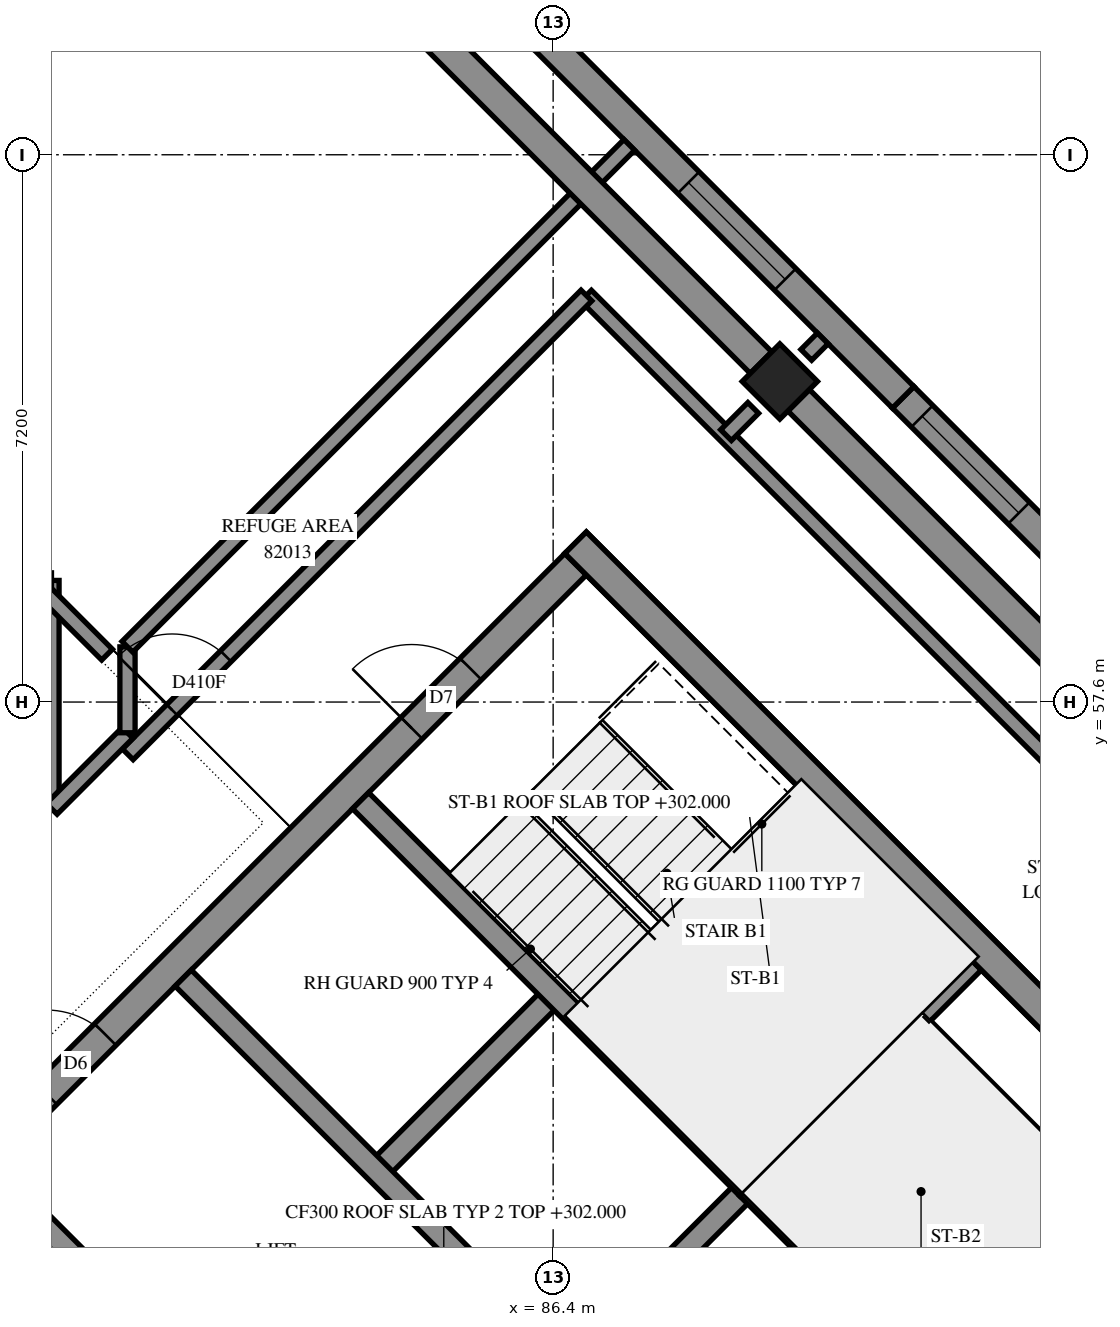
"""IFC4 building model, lengths in metres.
Left out: names, types, materials, properties, quantities, classifications, styles, units other than length and angle.
Written with IfcOpenShell. Run it as: python <this file> out.ifc"""

import sys

from ifc_helpers import new_model, si_unit, direction, frame, frame_2d, origin, origin_2d, place, context, subcontext, project, spatial, polyline, rectangle, outline, extrude, element, fill, save


model = new_model("IFC4")
c1 = context("Model", 3, precision=1e-05, world=origin(), true_north=direction((0.0, 1.0)))
c2 = subcontext(c1, "Body", "Model", "MODEL_VIEW")
j1 = project(units=[si_unit("LENGTHUNIT", "METRE"), si_unit("PLANEANGLEUNIT", "RADIAN")], contexts=[c1])
p1 = place(None, origin())
s1 = spatial("IfcSite", under=j1, at=p1, CompositionType="ELEMENT")
p2 = place(p1, origin())
s2 = spatial("IfcBuilding", under=s1, at=p2, CompositionType="ELEMENT")
p3 = place(p2, frame((0.0, 0.0, 302.0)))
s3 = spatial("IfcBuildingStorey", under=s2, at=p3, CompositionType="ELEMENT", Elevation=302.0)
p4 = place(p3, frame((89.382, 61.818, 0.0), z_axis=(0.0, 0.0, 1.0), x_axis=(0.7071067812, -0.7071067812, 0.0)))
e1 = element("IfcColumn", 1, at=p4, inside=s3, PredefinedType="COLUMN", context=c2, shape_type="SweptSolid", body=[
    extrude(rectangle(XDim=0.7, YDim=0.7, at=origin_2d()), origin(), (0.0, 0.0, 1.0), 3.5),
])
p5 = place(p3, frame((86.695, 59.696, -0.3), z_axis=(0.0, 0.0, 1.0), x_axis=(0.7071100706, -0.7071034917, 0.0)))
e2 = element("IfcWall", 2, at=p5, inside=s3, PredefinedType="SHEAR", context=c2, shape_type="SweptSolid", body=[
    extrude(outline(polyline([(0.0, 0.0), (15.2, 0.0), (15.2, 3.1), (0.0, 3.1), (0.0, 0.0)])), frame((0.0, 0.2, 0.0), z_axis=(0.0, -1.0, 0.0), x_axis=(1.0, 0.0, 0.0)), (0.0, 0.0, 1.0), 0.4),
])
p6 = place(p5, frame((10.4, 0.0, 0.3)))
e3 = element("IfcOpeningElement", 3, at=p6, cuts=e2, PredefinedType="OPENING", context=c2, shape_type="SweptSolid", body=[
    extrude(rectangle(XDim=0.8, YDim=2.1, at=frame_2d((0.4, 1.05))), frame((0.0, 0.21, 0.0), z_axis=(0.0, -1.0, 0.0), x_axis=(1.0, 0.0, 0.0)), (0.0, 0.0, 1.0), 0.42),
])
p7 = place(p3, frame((78.705, 51.423, -0.3), z_axis=(0.0, 0.0, 1.0), x_axis=(0.7071067812, 0.7071067812, 0.0)))
e4 = element("IfcWall", 4, at=p7, inside=s3, PredefinedType="SHEAR", context=c2, shape_type="SweptSolid", body=[
    extrude(outline(polyline([(0.0, 0.0), (11.3, 0.0), (11.3, 3.1), (0.0, 3.1), (0.0, 0.0)])), frame((0.0, 0.2, 0.0), z_axis=(0.0, -1.0, 0.0), x_axis=(1.0, 0.0, 0.0)), (0.0, 0.0, 1.0), 0.4),
])
p8 = place(p7, frame((1.45, 0.0, 0.3)))
e5 = element("IfcOpeningElement", 5, at=p8, cuts=e4, PredefinedType="OPENING", context=c2, shape_type="SweptSolid", body=[
    extrude(rectangle(XDim=1.1, YDim=2.1, at=frame_2d((0.55, 1.05))), frame((0.0, 0.21, 0.0), z_axis=(0.0, -1.0, 0.0), x_axis=(1.0, 0.0, 0.0)), (0.0, 0.0, 1.0), 0.42),
])
p9 = place(p7, frame((8.25, 0.0, 0.3)))
e6 = element("IfcOpeningElement", 6, at=p9, cuts=e4, PredefinedType="OPENING", context=c2, shape_type="SweptSolid", body=[
    extrude(rectangle(XDim=1.1, YDim=2.1, at=frame_2d((0.55, 1.05))), frame((0.0, 0.21, 0.0), z_axis=(0.0, -1.0, 0.0), x_axis=(1.0, 0.0, 0.0)), (0.0, 0.0, 1.0), 0.42),
])
p10 = place(p3, frame((84.079, 51.423, 0.0), z_axis=(0.0, 0.0, 1.0), x_axis=(0.7071219326, 0.7070916295, 0.0)))
e7 = element("IfcWall", 7, at=p10, inside=s3, PredefinedType="SOLIDWALL", context=c2, shape_type="SweptSolid", body=[
    extrude(outline(polyline([(0.0, 0.0), (3.3, 0.0), (3.3, 3.5), (0.0, 3.5), (0.0, 0.0)])), frame((0.0, 0.15, 0.0), z_axis=(0.0, -1.0, 0.0), x_axis=(1.0, 0.0, 0.0)), (0.0, 0.0, 1.0), 0.3),
])
p11 = place(p3, frame((86.625, 48.878, 0.0), z_axis=(0.0, 0.0, 1.0), x_axis=(0.7071067812, 0.7071067812, 0.0)))
e8 = element("IfcWall", 8, at=p11, inside=s3, PredefinedType="SOLIDWALL", context=c2, shape_type="SweptSolid", body=[
    extrude(outline(polyline([(0.0, 0.0), (3.3, 0.0), (3.3, 3.5), (0.0, 3.5), (0.0, 0.0)])), frame((0.0, 0.15, 0.0), z_axis=(0.0, -1.0, 0.0), x_axis=(1.0, 0.0, 0.0)), (0.0, 0.0, 1.0), 0.3),
])
p12 = place(p3, frame((78.988, 51.423, 0.0), z_axis=(0.0, 0.0, 1.0), x_axis=(0.7071067812, -0.7071067812, 0.0)))
e9 = element("IfcWall", 9, at=p12, inside=s3, PredefinedType="SOLIDWALL", context=c2, shape_type="SweptSolid", body=[
    extrude(outline(polyline([(0.0, 0.0), (14.4, 0.0), (14.4, 3.5), (0.0, 3.5), (0.0, 0.0)])), frame((0.0, 0.15, 0.0), z_axis=(0.0, -1.0, 0.0), x_axis=(1.0, 0.0, 0.0)), (0.0, 0.0, 1.0), 0.3),
])
p13 = place(p3, frame((81.534, 53.969, 0.0), z_axis=(0.0, 0.0, 1.0), x_axis=(0.707103309, -0.7071102534, 0.0)))
e10 = element("IfcWall", 10, at=p13, inside=s3, PredefinedType="SOLIDWALL", context=c2, shape_type="SweptSolid", body=[
    extrude(outline(polyline([(0.0, 0.0), (14.4, 0.0), (14.4, 3.5), (0.0, 3.5), (0.0, 0.0)])), frame((0.0, 0.15, 0.0), z_axis=(0.0, -1.0, 0.0), x_axis=(1.0, 0.0, 0.0)), (0.0, 0.0, 1.0), 0.3),
])
p14 = place(p13, frame((12.05, 0.0, 0.0)))
e11 = element("IfcOpeningElement", 11, at=p14, cuts=e10, PredefinedType="OPENING", context=c2, shape_type="SweptSolid", body=[
    extrude(rectangle(XDim=1.1, YDim=2.1, at=frame_2d((0.55, 1.05))), frame((0.0, 0.16, 0.0), z_axis=(0.0, -1.0, 0.0), x_axis=(1.0, 0.0, 0.0)), (0.0, 0.0, 1.0), 0.32),
])
for number, where, z_axis, x_axis in (
    (12, (83.867, 56.302, 0.0), (0.0, 0.0, 1.0), (0.707, -0.707, 0.0)),
    (13, (88.958, 51.211, 0.0), (0.0, 0.0, 1.0), (0.707, -0.707, 0.0)),
):
    element("IfcWall", number, at=place(p3, frame(where, z_axis=z_axis, x_axis=x_axis)), inside=s3, PredefinedType="SOLIDWALL", context=c2, shape_type="SweptSolid", body=[
        extrude(outline(polyline([(0.0, 0.0), (7.2, 0.0), (7.2, 3.5), (0.0, 3.5), (0.0, 0.0)])), frame((0.0, 0.15, 0.0), z_axis=(0.0, -1.0, 0.0), x_axis=(1.0, 0.0, 0.0)), (0.0, 0.0, 1.0), 0.3),
    ])
p15 = place(p3, frame((88.958, 51.211, 0.0), z_axis=(0.0, 0.0, 1.0), x_axis=(0.7071067812, 0.7071067812, 0.0)))
e14 = element("IfcWall", 14, at=p15, inside=s3, PredefinedType="SOLIDWALL", context=c2, shape_type="SweptSolid", body=[
    extrude(outline(polyline([(0.0, 0.0), (4.2, 0.0), (4.2, 3.5), (0.0, 3.5), (0.0, 0.0)])), frame((0.0, 0.15, 0.0), z_axis=(0.0, -1.0, 0.0), x_axis=(1.0, 0.0, 0.0)), (0.0, 0.0, 1.0), 0.3),
])
p16 = place(p3, frame((95.73, 56.884, 0.0), z_axis=(0.0, 0.0, 1.0), x_axis=(-0.7071067812, 0.7071067812, 0.0)))
e15 = element("IfcWall", 15, at=p16, inside=s3, PredefinedType="SOLIDWALL", context=c2, shape_type="SweptSolid", body=[
    extrude(outline(polyline([(0.0, -0.2), (6.682, -0.2), (6.682, 0.2), (0.0, 0.2), (0.0, -0.2)])), origin(), (0.0, 0.0, 1.0), 3.5),
])
p17 = place(p16, frame((1.677, 0.0, 0.7)))
e16 = element("IfcOpeningElement", 16, at=p17, cuts=e15, PredefinedType="OPENING", context=c2, shape_type="SweptSolid", body=[
    extrude(rectangle(XDim=1.8, YDim=2.2, at=frame_2d((0.9, 1.1))), frame((0.0, 0.21, 0.0), z_axis=(0.0, -1.0, 0.0), x_axis=(1.0, 0.0, 0.0)), (0.0, 0.0, 1.0), 0.42),
])
p18 = place(p16, frame((4.529, 0.0, 0.7)))
e17 = element("IfcOpeningElement", 17, at=p18, cuts=e15, PredefinedType="OPENING", context=c2, shape_type="SweptSolid", body=[
    extrude(rectangle(XDim=1.8, YDim=2.2, at=frame_2d((0.9, 1.1))), frame((0.0, 0.21, 0.0), z_axis=(0.0, -1.0, 0.0), x_axis=(1.0, 0.0, 0.0)), (0.0, 0.0, 1.0), 0.42),
])
p19 = place(p3, frame((91.005, 61.609, 0.0), z_axis=(0.0, 0.0, 1.0), x_axis=(-0.7071142638, 0.7070992985, 0.0)))
e18 = element("IfcWall", 18, at=p19, inside=s3, PredefinedType="SOLIDWALL", context=c2, shape_type="SweptSolid", body=[
    extrude(outline(polyline([(0.0, -0.2), (6.682, -0.2), (6.682, 0.2), (0.0, 0.2), (0.0, -0.2)])), origin(), (0.0, 0.0, 1.0), 3.5),
])
p20 = place(p19, frame((2.195, 0.0, 0.7)))
e19 = element("IfcOpeningElement", 19, at=p20, cuts=e18, PredefinedType="OPENING", context=c2, shape_type="SweptSolid", body=[
    extrude(rectangle(XDim=1.8, YDim=2.2, at=frame_2d((0.9, 1.1))), frame((0.0, 0.21, 0.0), z_axis=(0.0, -1.0, 0.0), x_axis=(1.0, 0.0, 0.0)), (0.0, 0.0, 1.0), 0.42),
])
p21 = place(p3, frame((72.821, 56.6, 0.0), z_axis=(0.0, 0.0, 1.0), x_axis=(0.7071067812, -0.7071067812, 0.0)))
e20 = element("IfcWall", 20, at=p21, inside=s3, PredefinedType="SOLIDWALL", context=c2, shape_type="SweptSolid", body=[
    extrude(outline(polyline([(0.083, -0.2), (30.821, -0.2), (30.421, 0.2), (-0.083, 0.2), (0.083, -0.2)])), origin(), (0.0, 0.0, 1.0), 3.5),
])
p22 = place(p21, frame((2.421, 0.0, 0.7)))
e21 = element("IfcOpeningElement", 21, at=p22, cuts=e20, PredefinedType="OPENING", context=c2, shape_type="SweptSolid", body=[
    extrude(rectangle(XDim=1.8, YDim=2.2, at=frame_2d((0.9, 1.1))), frame((0.0, 0.21, 0.0), z_axis=(0.0, -1.0, 0.0), x_axis=(1.0, 0.0, 0.0)), (0.0, 0.0, 1.0), 0.42),
])
p23 = place(p21, frame((5.521, 0.0, 0.7)))
e22 = element("IfcOpeningElement", 22, at=p23, cuts=e20, PredefinedType="OPENING", context=c2, shape_type="SweptSolid", body=[
    extrude(rectangle(XDim=1.8, YDim=2.2, at=frame_2d((0.9, 1.1))), frame((0.0, 0.21, 0.0), z_axis=(0.0, -1.0, 0.0), x_axis=(1.0, 0.0, 0.0)), (0.0, 0.0, 1.0), 0.42),
])
p24 = place(p21, frame((8.921, 0.0, 0.7)))
e23 = element("IfcOpeningElement", 23, at=p24, cuts=e20, PredefinedType="OPENING", context=c2, shape_type="SweptSolid", body=[
    extrude(rectangle(XDim=1.8, YDim=2.2, at=frame_2d((0.9, 1.1))), frame((0.0, 0.21, 0.0), z_axis=(0.0, -1.0, 0.0), x_axis=(1.0, 0.0, 0.0)), (0.0, 0.0, 1.0), 0.42),
])
p25 = place(p21, frame((12.521, 0.0, 0.7)))
e24 = element("IfcOpeningElement", 24, at=p25, cuts=e20, PredefinedType="OPENING", context=c2, shape_type="SweptSolid", body=[
    extrude(rectangle(XDim=1.8, YDim=2.2, at=frame_2d((0.9, 1.1))), frame((0.0, 0.21, 0.0), z_axis=(0.0, -1.0, 0.0), x_axis=(1.0, 0.0, 0.0)), (0.0, 0.0, 1.0), 0.42),
])
p26 = place(p21, frame((16.121, 0.0, 0.7)))
e25 = element("IfcOpeningElement", 25, at=p26, cuts=e20, PredefinedType="OPENING", context=c2, shape_type="SweptSolid", body=[
    extrude(rectangle(XDim=1.8, YDim=2.2, at=frame_2d((0.9, 1.1))), frame((0.0, 0.21, 0.0), z_axis=(0.0, -1.0, 0.0), x_axis=(1.0, 0.0, 0.0)), (0.0, 0.0, 1.0), 0.42),
])
p27 = place(p21, frame((19.721, 0.0, 0.7)))
e26 = element("IfcOpeningElement", 26, at=p27, cuts=e20, PredefinedType="OPENING", context=c2, shape_type="SweptSolid", body=[
    extrude(rectangle(XDim=1.8, YDim=2.2, at=frame_2d((0.9, 1.1))), frame((0.0, 0.21, 0.0), z_axis=(0.0, -1.0, 0.0), x_axis=(1.0, 0.0, 0.0)), (0.0, 0.0, 1.0), 0.42),
])
p28 = place(p21, frame((23.071, 0.0, 0.7)))
e27 = element("IfcOpeningElement", 27, at=p28, cuts=e20, PredefinedType="OPENING", context=c2, shape_type="SweptSolid", body=[
    extrude(rectangle(XDim=1.8, YDim=2.2, at=frame_2d((0.9, 1.1))), frame((0.0, 0.21, 0.0), z_axis=(0.0, -1.0, 0.0), x_axis=(1.0, 0.0, 0.0)), (0.0, 0.0, 1.0), 0.42),
])
p29 = place(p21, frame((26.921, 0.0, 0.7)))
e28 = element("IfcOpeningElement", 28, at=p29, cuts=e20, PredefinedType="OPENING", context=c2, shape_type="SweptSolid", body=[
    extrude(rectangle(XDim=1.8, YDim=2.2, at=frame_2d((0.9, 1.1))), frame((0.0, 0.21, 0.0), z_axis=(0.0, -1.0, 0.0), x_axis=(1.0, 0.0, 0.0)), (0.0, 0.0, 1.0), 0.42),
])
p30 = place(p3, frame((91.313, 53.354, 0.0), z_axis=(0.0, 0.0, 1.0), x_axis=(0.7071147811, -0.7070987812, 0.0)))
e29 = element("IfcWall", 29, at=p30, inside=s3, PredefinedType="PARTITIONING", context=c2, shape_type="SweptSolid", body=[
    extrude(outline(polyline([(0.0, 0.0), (6.25, 0.0), (6.25, 3.5), (0.0, 3.5), (0.0, 0.0)])), frame((0.0, 0.075, 0.0), z_axis=(0.0, -1.0, 0.0), x_axis=(1.0, 0.0, 0.0)), (0.0, 0.0, 1.0), 0.15),
])
p31 = place(p3, frame((86.833, 62.947, 0.0), z_axis=(0.0, 0.0, 1.0), x_axis=(0.7071067812, -0.7071067812, 0.0)))
e30 = element("IfcWall", 30, at=p31, inside=s3, PredefinedType="PARTITIONING", context=c2, shape_type="SweptSolid", body=[
    extrude(rectangle(XDim=19.601, YDim=0.2, at=frame_2d((9.8, 0.0))), origin(), (0.0, 0.0, 1.0), 3.5),
])
p32 = place(p31, frame((10.386, 0.0, 0.0)))
e31 = element("IfcOpeningElement", 31, at=p32, cuts=e30, PredefinedType="OPENING", context=c2, shape_type="SweptSolid", body=[
    extrude(rectangle(XDim=1.0, YDim=2.1, at=frame_2d((0.5, 1.05))), frame((0.0, 0.11, 0.0), z_axis=(0.0, -1.0, 0.0), x_axis=(1.0, 0.0, 0.0)), (0.0, 0.0, 1.0), 0.22),
])
p33 = place(p3, frame((80.804, 56.912, 0.0), z_axis=(0.0, 0.0, 1.0), x_axis=(0.7069896038, 0.7072239391, 0.0)))
e32 = element("IfcWall", 32, at=p33, inside=s3, PredefinedType="PARTITIONING", context=c2, shape_type="SweptSolid", body=[
    extrude(rectangle(XDim=8.535, YDim=0.2, at=frame_2d((4.267, 0.0))), origin(), (0.0, 0.0, 1.0), 3.5),
])
p34 = place(p33, frame((0.825, 0.0, 0.0)))
e33 = element("IfcOpeningElement", 33, at=p34, cuts=e32, PredefinedType="OPENING", context=c2, shape_type="SweptSolid", body=[
    extrude(rectangle(XDim=1.0, YDim=2.1, at=frame_2d((0.5, 1.05))), frame((0.0, 0.11, 0.0), z_axis=(0.0, -1.0, 0.0), x_axis=(1.0, 0.0, 0.0)), (0.0, 0.0, 1.0), 0.22),
])
p35 = place(p3, frame((79.8, 56.198, 0.0), z_axis=(0.0, 0.0, 1.0), x_axis=(0.0, 1.0, 0.0)))
e34 = element("IfcWall", 34, at=p35, inside=s3, PredefinedType="PARTITIONING", context=c2, shape_type="SweptSolid", body=[
    extrude(rectangle(XDim=3.002, YDim=0.2, at=frame_2d((1.501, 0.0))), origin(), (0.0, 0.0, 1.0), 3.5),
])
p36 = place(p3, frame((79.803, 56.195, 0.0), z_axis=(0.0, 0.0, 1.0), x_axis=(0.7063986127, 0.7078142412, 0.0)))
e35 = element("IfcWall", 35, at=p36, inside=s3, PredefinedType="PARTITIONING", context=c2, shape_type="SweptSolid", body=[
    extrude(rectangle(XDim=1.413, YDim=0.2, at=frame_2d((0.706, 0.0))), origin(), (0.0, 0.0, 1.0), 3.5),
])
p37 = place(p3, frame((80.8, 57.196, 0.0), z_axis=(0.0, 0.0, 1.0), x_axis=(0.0, 1.0, 0.0)))
e36 = element("IfcWall", 36, at=p37, inside=s3, PredefinedType="PARTITIONING", context=c2, shape_type="SweptSolid", body=[
    extrude(rectangle(XDim=1.13, YDim=0.2, at=frame_2d((0.565, 0.0))), origin(), (0.0, 0.0, 1.0), 3.5),
])
p38 = place(p3, frame((88.674, 61.111, 0.0), z_axis=(0.0, 0.0, 1.0), x_axis=(0.7071067812, 0.7071067812, 0.0)))
e37 = element("IfcWall", 37, at=p38, inside=s3, PredefinedType="PARTITIONING", context=c2, shape_type="SweptSolid", body=[
    extrude(rectangle(XDim=0.506, YDim=0.2, at=frame_2d((0.253, 0.0))), origin(), (0.0, 0.0, 1.0), 3.5),
])
p39 = place(p3, frame((80.531, 58.224, 0.0), z_axis=(0.0, 0.0, 1.0), x_axis=(-0.7071219462, 0.7070916158, 0.0)))
e38 = element("IfcWall", 38, at=p39, inside=s3, PredefinedType="PARAPET", context=c2, shape_type="SweptSolid", body=[
    extrude(outline(polyline([(0.0, -0.1), (3.315, -0.1), (3.279, 0.1), (0.0, 0.1), (0.0, -0.1)])), origin(), (0.0, 0.0, 1.0), 0.25),
])
p40 = place(p3, frame((80.799, 58.327, 0.0), z_axis=(0.0, 0.0, 1.0), x_axis=(0.7071067812, 0.7071067812, 0.0)))
e39 = element("IfcWall", 39, at=p40, inside=s3, PredefinedType="PARTITIONING", context=c2, shape_type="SweptSolid", body=[
    extrude(outline(polyline([(0.0, -0.1), (9.338, -0.1), (9.338, 0.1), (0.0, 0.1), (0.0, -0.1)])), origin(), (0.0, 0.0, 1.0), 3.5),
])
p41 = place(p3, frame((89.731, 62.167, 0.0), z_axis=(0.0, 0.0, 1.0), x_axis=(0.7071067812, 0.7071067812, 0.0)))
e40 = element("IfcWall", 40, at=p41, inside=s3, PredefinedType="PARTITIONING", context=c2, shape_type="SweptSolid", body=[
    extrude(outline(polyline([(0.0, -0.1), (0.306, -0.1), (0.306, 0.1), (0.0, 0.1), (0.0, -0.1)])), origin(), (0.0, 0.0, 1.0), 3.5),
])
p42 = place(p18, origin())
e41 = element("IfcWindow", 41, at=p42, inside=s3, PartitioningType="SINGLE_PANEL", PredefinedType="WINDOW", context=c2, shape_type="SweptSolid", body=[
    extrude(rectangle(XDim=1.8, YDim=2.2, at=frame_2d((0.9, 1.1))), frame((0.0, 0.08, 0.0), z_axis=(0.0, -1.0, 0.0), x_axis=(1.0, 0.0, 0.0)), (0.0, 0.0, 1.0), 0.06),
])
fill(e17, e41)
p43 = place(p20, origin())
e42 = element("IfcWindow", 42, at=p43, inside=s3, PartitioningType="SINGLE_PANEL", PredefinedType="WINDOW", context=c2, shape_type="SweptSolid", body=[
    extrude(rectangle(XDim=1.8, YDim=2.2, at=frame_2d((0.9, 1.1))), frame((0.0, 0.08, 0.0), z_axis=(0.0, -1.0, 0.0), x_axis=(1.0, 0.0, 0.0)), (0.0, 0.0, 1.0), 0.06),
])
fill(e19, e42)
p44 = place(p8, origin())
e43 = element("IfcDoor", 43, at=p44, inside=s3, OperationType="DOUBLE_DOOR_SINGLE_SWING", PredefinedType="DOOR", context=c2, shape_type="SweptSolid", body=[
    extrude(rectangle(XDim=1.1, YDim=2.1, at=frame_2d((0.55, 1.05))), frame((0.0, 0.025, 0.0), z_axis=(0.0, -1.0, 0.0), x_axis=(1.0, 0.0, 0.0)), (0.0, 0.0, 1.0), 0.05),
])
fill(e5, e43)
p45 = place(p9, origin())
e44 = element("IfcDoor", 44, at=p45, inside=s3, OperationType="SINGLE_SWING_LEFT", PredefinedType="DOOR", context=c2, shape_type="SweptSolid", body=[
    extrude(rectangle(XDim=1.1, YDim=2.1, at=frame_2d((0.55, 1.05))), frame((0.0, 0.025, 0.0), z_axis=(0.0, -1.0, 0.0), x_axis=(1.0, 0.0, 0.0)), (0.0, 0.0, 1.0), 0.05),
])
fill(e6, e44)
p46 = place(p34, origin())
e45 = element("IfcDoor", 45, at=p46, inside=s3, OperationType="SINGLE_SWING_RIGHT", PredefinedType="DOOR", context=c2, shape_type="SweptSolid", body=[
    extrude(rectangle(XDim=1.0, YDim=2.1, at=frame_2d((0.5, 1.05))), frame((0.0, 0.025, 0.0), z_axis=(0.0, -1.0, 0.0), x_axis=(1.0, 0.0, 0.0)), (0.0, 0.0, 1.0), 0.05),
])
fill(e33, e45)
save(model, sys.argv[1])
